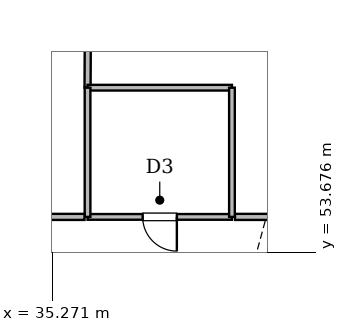
"""IFC4 building model, lengths in metres.
Left out: names, types, materials, properties, quantities, classifications, styles, units other than length and angle.
Written with IfcOpenShell. Run it as: python <this file> out.ifc"""

import sys

from ifc_helpers import new_model, si_unit, direction, frame, frame_2d, origin, place, context, subcontext, project, spatial, rectangle, extrude, element, fill, save


model = new_model("IFC4")
c1 = context("Model", 3, precision=1e-05, world=origin(), true_north=direction((0.0, 1.0)))
c2 = subcontext(c1, "Body", "Model", "MODEL_VIEW")
j1 = project(units=[si_unit("LENGTHUNIT", "METRE"), si_unit("PLANEANGLEUNIT", "RADIAN")], contexts=[c1])
p1 = place(None, origin())
s1 = spatial("IfcSite", under=j1, at=p1, CompositionType="ELEMENT")
p2 = place(p1, origin())
s2 = spatial("IfcBuilding", under=s1, at=p2, CompositionType="ELEMENT")
p3 = place(p2, frame((0.0, 0.0, 19.2)))
s3 = spatial("IfcBuildingStorey", under=s2, at=p3, CompositionType="ELEMENT", Elevation=19.2)
p4 = place(p3, frame((52.47, 54.6, 0.0), z_axis=(0.0, 0.0, 1.0), x_axis=(-1.0, 0.0, 0.0)))
e1 = element("IfcWall", 1, at=p4, inside=s3, PredefinedType="SOLIDWALL", context=c2, shape_type="SweptSolid", body=[
    extrude(rectangle(XDim=12.39, YDim=0.16, at=frame_2d((6.195, 0.0))), origin(), (0.0, 0.0, 1.0), 3.638),
])
p5 = place(p4, frame((5.645, 0.0, 0.0)))
e2 = element("IfcOpeningElement", 2, at=p5, cuts=e1, PredefinedType="OPENING", context=c2, shape_type="SweptSolid", body=[
    extrude(rectangle(XDim=1.1, YDim=2.15, at=frame_2d((0.55, 1.075))), frame((0.0, 0.09, 0.0), z_axis=(0.0, -1.0, 0.0), x_axis=(1.0, 0.0, 0.0)), (0.0, 0.0, 1.0), 0.18),
])
p6 = place(p3, frame((40.0, 54.6, 0.0), z_axis=(0.0, 0.0, 1.0), x_axis=(-1.0, 0.0, 0.0)))
e3 = element("IfcWall", 3, at=p6, inside=s3, PredefinedType="PLUMBINGWALL", context=c2, shape_type="SweptSolid", body=[
    extrude(rectangle(XDim=3.8, YDim=0.15, at=frame_2d((1.9, 0.0))), origin(), (0.0, 0.0, 1.0), 3.638),
])
p7 = place(p6, frame((1.45, 0.0, 0.0)))
e4 = element("IfcOpeningElement", 4, at=p7, cuts=e3, PredefinedType="OPENING", context=c2, shape_type="SweptSolid", body=[
    extrude(rectangle(XDim=0.9, YDim=2.1, at=frame_2d((0.45, 1.05))), frame((0.0, 0.085, 0.0), z_axis=(0.0, -1.0, 0.0), x_axis=(1.0, 0.0, 0.0)), (0.0, 0.0, 1.0), 0.17),
])
p8 = place(p3, frame((36.2, 58.0, 0.0), z_axis=(0.0, 0.0, 1.0), x_axis=(0.005539131593, 0.999984658893, 0.0)))
e5 = element("IfcWall", 5, at=p8, inside=s3, PredefinedType="SOLIDWALL", context=c2, shape_type="SweptSolid", body=[
    extrude(rectangle(XDim=13.531, YDim=0.16, at=frame_2d((6.766, 0.0))), origin(), (0.0, 0.0, 1.0), 3.638),
])
p9 = place(p3, frame((40.0, 58.0, 0.0), z_axis=(0.0, 0.0, 1.0), x_axis=(-1.0, 0.0, 0.0)))
e6 = element("IfcWall", 6, at=p9, inside=s3, PredefinedType="PLUMBINGWALL", context=c2, shape_type="SweptSolid", body=[
    extrude(rectangle(XDim=3.8, YDim=0.15, at=frame_2d((1.9, 0.0))), origin(), (0.0, 0.0, 1.0), 4.35),
])
p10 = place(p3, frame((36.2, 58.0, 0.0), z_axis=(0.0, 0.0, 1.0), x_axis=(0.0, -1.0, 0.0)))
e7 = element("IfcWall", 7, at=p10, inside=s3, PredefinedType="PLUMBINGWALL", context=c2, shape_type="SweptSolid", body=[
    extrude(rectangle(XDim=3.4, YDim=0.15, at=frame_2d((1.7, 0.0))), origin(), (0.0, 0.0, 1.0), 4.35),
])
p11 = place(p3, frame((40.0, 54.6, 0.0), z_axis=(0.0, 0.0, 1.0), x_axis=(0.0, 1.0, 0.0)))
e8 = element("IfcWall", 8, at=p11, inside=s3, PredefinedType="PLUMBINGWALL", context=c2, shape_type="SweptSolid", body=[
    extrude(rectangle(XDim=3.4, YDim=0.15, at=frame_2d((1.7, 0.0))), origin(), (0.0, 0.0, 1.0), 3.638),
])
p12 = place(p3, frame((36.12, 54.6, 0.0), z_axis=(0.0, 0.0, 1.0), x_axis=(-1.0, 0.0, 0.0)))
e9 = element("IfcWall", 9, at=p12, inside=s3, PredefinedType="SOLIDWALL", context=c2, shape_type="SweptSolid", body=[
    extrude(rectangle(XDim=2.64, YDim=0.16, at=frame_2d((1.32, 0.0))), origin(), (0.0, 0.0, 1.0), 4.35),
])
p13 = place(p7, origin())
e10 = element("IfcDoor", 10, at=p13, inside=s3, OperationType="SINGLE_SWING_LEFT", PredefinedType="DOOR", context=c2, shape_type="SweptSolid", body=[
    extrude(rectangle(XDim=0.9, YDim=2.1, at=frame_2d((0.45, 1.05))), frame((0.0, 0.025, 0.0), z_axis=(0.0, -1.0, 0.0), x_axis=(1.0, 0.0, 0.0)), (0.0, 0.0, 1.0), 0.05),
])
fill(e4, e10)
save(model, sys.argv[1])
